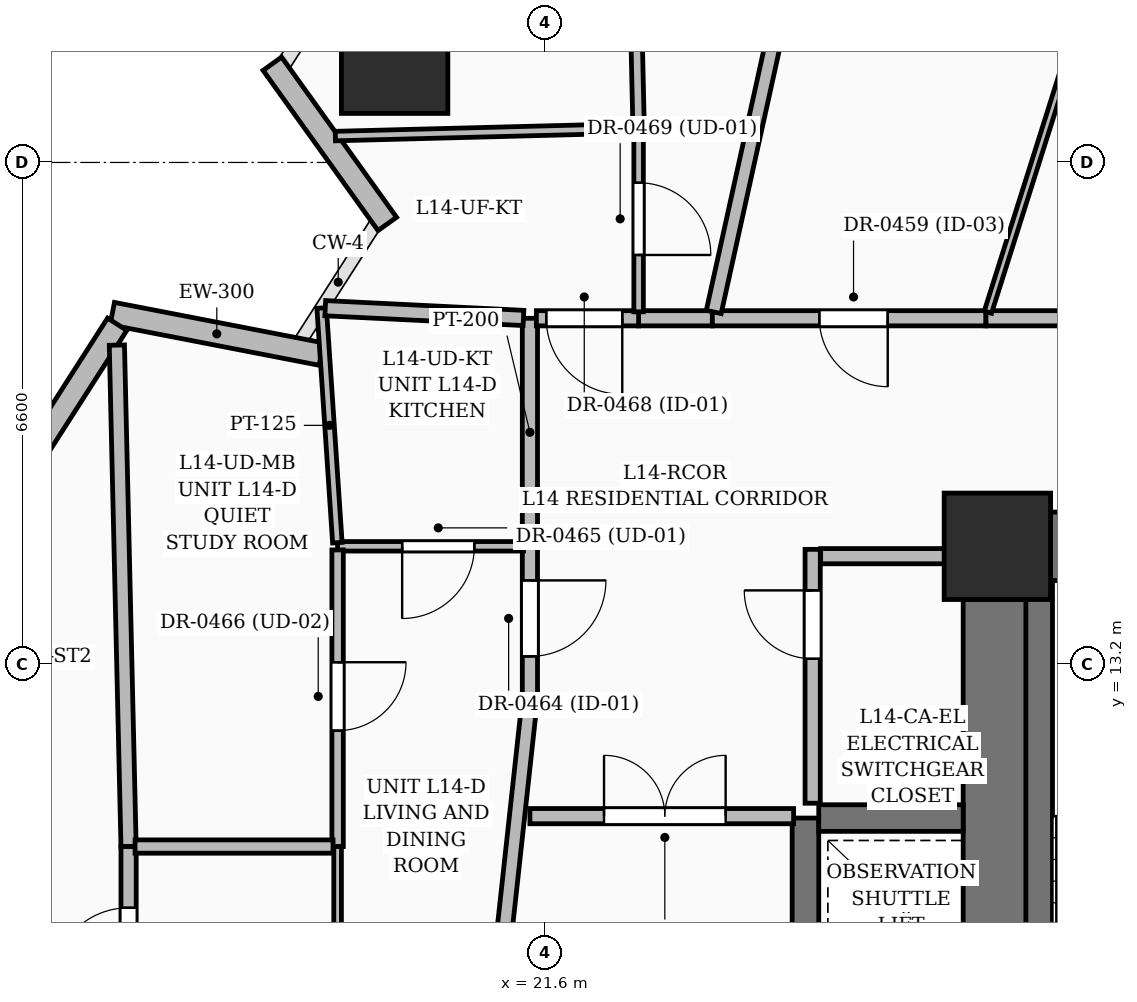
"""IFC4 building model, lengths in metres.
Left out: names, types, materials, properties, quantities, classifications, styles, units other than length and angle.
Written with IfcOpenShell. Run it as: python <this file> out.ifc"""

import sys

from ifc_helpers import new_model, si_unit, direction, frame, frame_2d, origin, origin_2d, place, context, subcontext, project, spatial, rectangle, extrude, element, fill, save


model = new_model("IFC4")
c1 = context("Model", 3, precision=1e-05, world=origin(), true_north=direction((0.0, 1.0)))
c2 = subcontext(c1, "Body", "Model", "MODEL_VIEW")
j1 = project(units=[si_unit("LENGTHUNIT", "METRE"), si_unit("PLANEANGLEUNIT", "RADIAN")], contexts=[c1])
p1 = place(None, origin())
s1 = spatial("IfcSite", under=j1, at=p1, CompositionType="ELEMENT")
p2 = place(p1, origin())
s2 = spatial("IfcBuilding", under=s1, at=p2, CompositionType="ELEMENT")
p3 = place(p2, frame((0.0, 0.0, 60.6)))
s3 = spatial("IfcBuildingStorey", under=s2, at=p3, CompositionType="ELEMENT", Elevation=60.6)
p4 = place(p3, frame((27.55, 14.75, 0.0), z_axis=(0.0, 0.0, 1.0), x_axis=(1.0, 0.0, 0.0)))
e1 = element("IfcColumn", 1, at=p4, inside=s3, PredefinedType="COLUMN", context=c2, shape_type="SweptSolid", body=[
    extrude(rectangle(XDim=1.4, YDim=1.4, at=origin_2d()), origin(), (0.0, 0.0, 1.0), 3.6),
])
p5 = place(p3, frame((28.25, 14.75, 0.0), z_axis=(0.0, 0.0, 1.0), x_axis=(1.0, 0.0, 0.0)))
e2 = element("IfcWall", 2, at=p5, inside=s3, PredefinedType="SHEAR", context=c2, shape_type="SweptSolid", body=[
    extrude(rectangle(XDim=6.2, YDim=0.9, at=frame_2d((3.1, 0.0))), origin(), (0.0, 0.0, 1.0), 3.6),
])
p6 = place(p5, frame((0.925, 0.0, 0.0)))
e3 = element("IfcOpeningElement", 3, at=p6, cuts=e2, PredefinedType="OPENING", context=c2, shape_type="SweptSolid", body=[
    extrude(rectangle(XDim=1.05, YDim=2.15, at=frame_2d((0.525, 1.075))), frame((0.0, 0.46, 0.0), z_axis=(0.0, -1.0, 0.0), x_axis=(1.0, 0.0, 0.0)), (0.0, 0.0, 1.0), 0.92),
])
p7 = place(p3, frame((27.55, 5.25, 0.0), z_axis=(0.0, 0.0, 1.0), x_axis=(0.0, 1.0, 0.0)))
e4 = element("IfcWall", 4, at=p7, inside=s3, PredefinedType="SHEAR", context=c2, shape_type="SweptSolid", body=[
    extrude(rectangle(XDim=8.8, YDim=0.9, at=frame_2d((4.4, 0.0))), origin(), (0.0, 0.0, 1.0), 3.6),
])
p8 = place(p3, frame((28.1, 5.2, 0.0), z_axis=(0.0, 0.0, 1.0), x_axis=(0.0, 1.0, 0.0)))
e5 = element("IfcWall", 5, at=p8, inside=s3, PredefinedType="SOLIDWALL", context=c2, shape_type="SweptSolid", body=[
    extrude(rectangle(XDim=9.1, YDim=0.35, at=frame_2d((4.55, 0.0))), origin(), (0.0, 0.0, 1.0), 3.6),
])
p9 = place(p3, frame((25.025, 6.225, 0.0), z_axis=(0.0, 0.0, 1.0), x_axis=(0.0, 1.0, 0.0)))
e6 = element("IfcWall", 6, at=p9, inside=s3, PredefinedType="SOLIDWALL", context=c2, shape_type="SweptSolid", body=[
    extrude(rectangle(XDim=4.95, YDim=0.35, at=frame_2d((2.475, 0.0))), origin(), (0.0, 0.0, 1.0), 3.6),
])
p10 = place(p3, frame((25.2, 11.175, 0.0), z_axis=(0.0, 0.0, 1.0), x_axis=(1.0, 0.0, 0.0)))
e7 = element("IfcWall", 7, at=p10, inside=s3, PredefinedType="SOLIDWALL", context=c2, shape_type="SweptSolid", body=[
    extrude(rectangle(XDim=1.9, YDim=0.35, at=frame_2d((0.95, 0.0))), origin(), (0.0, 0.0, 1.0), 3.6),
])
p11 = place(p3, frame((19.62, 21.145, 0.0), z_axis=(0.0, 0.0, 1.0), x_axis=(1.0, 0.0, 0.0)))
e8 = element("IfcColumn", 8, at=p11, inside=s3, PredefinedType="COLUMN", context=c2, shape_type="SweptSolid", body=[
    extrude(rectangle(XDim=1.4, YDim=1.4, at=origin_2d()), origin(), (0.0, 0.0, 1.0), 3.6),
])
p12 = place(p3, frame((15.906, 17.812, 0.0), z_axis=(0.0, 0.0, 1.0), x_axis=(0.981749415704, -0.190179086032, 0.0)))
e9 = element("IfcWall", 9, at=p12, inside=s3, PredefinedType="SOLIDWALL", context=c2, shape_type="SweptSolid", body=[
    extrude(rectangle(XDim=2.801, YDim=0.3, at=frame_2d((1.4, 0.0))), origin(), (0.0, 0.0, 1.0), 2.375),
])
p13 = place(p3, frame((19.524, 18.991, 0.0), z_axis=(0.0, 0.0, 1.0), x_axis=(-0.58299973372, 0.812472344442, 0.0)))
e10 = element("IfcWall", 10, at=p13, inside=s3, PredefinedType="SOLIDWALL", context=c2, shape_type="SweptSolid", body=[
    extrude(rectangle(XDim=2.594, YDim=0.3, at=frame_2d((1.297, 0.0))), origin(), (0.0, 0.0, 1.0), 2.375),
])
p14 = place(p3, frame((12.324, 11.981, 0.0), z_axis=(0.0, 0.0, 1.0), x_axis=(0.539544650361, 0.841956988371, 0.0)))
e11 = element("IfcWall", 11, at=p14, inside=s3, PredefinedType="SOLIDWALL", context=c2, shape_type="SweptSolid", body=[
    extrude(rectangle(XDim=6.758, YDim=0.3, at=frame_2d((3.379, 0.0))), origin(), (0.0, 0.0, 1.0), 3.35),
])
p15 = place(p14, frame((2.1, 0.0, 0.55)))
e12 = element("IfcOpeningElement", 12, at=p15, cuts=e11, PredefinedType="OPENING", context=c2, shape_type="SweptSolid", body=[
    extrude(rectangle(XDim=2.1, YDim=2.4, at=frame_2d((1.05, 1.2))), frame((0.0, 0.16, 0.0), z_axis=(0.0, -1.0, 0.0), x_axis=(1.0, 0.0, 0.0)), (0.0, 0.0, 1.0), 0.32),
])
p16 = place(p3, frame((25.12, 11.37, 0.0), z_axis=(0.0, 0.0, 1.0), x_axis=(0.0, 1.0, 0.0)))
e13 = element("IfcWall", 13, at=p16, inside=s3, PredefinedType="PARTITIONING", context=c2, shape_type="SweptSolid", body=[
    extrude(rectangle(XDim=3.34, YDim=0.2, at=frame_2d((1.67, 0.0))), origin(), (0.0, 0.0, 1.0), 3.35),
])
p17 = place(p16, frame((1.9, 0.0, 0.0)))
e14 = element("IfcOpeningElement", 14, at=p17, cuts=e13, PredefinedType="OPENING", context=c2, shape_type="SweptSolid", body=[
    extrude(rectangle(XDim=0.9, YDim=2.1, at=frame_2d((0.45, 1.05))), frame((0.0, 0.11, 0.0), z_axis=(0.0, -1.0, 0.0), x_axis=(1.0, 0.0, 0.0)), (0.0, 0.0, 1.0), 0.22),
])
p18 = place(p3, frame((25.225, 14.62, 0.0), z_axis=(0.0, 0.0, 1.0), x_axis=(1.0, 0.0, 0.0)))
e15 = element("IfcWall", 15, at=p18, inside=s3, PredefinedType="PARTITIONING", context=c2, shape_type="SweptSolid", body=[
    extrude(rectangle(XDim=1.86, YDim=0.2, at=frame_2d((0.93, 0.0))), origin(), (0.0, 0.0, 1.0), 3.35),
])
p19 = place(p3, frame((21.4, 11.2, 0.0), z_axis=(0.0, 0.0, 1.0), x_axis=(1.0, 0.0, 0.0)))
e16 = element("IfcWall", 16, at=p19, inside=s3, PredefinedType="PARTITIONING", context=c2, shape_type="SweptSolid", body=[
    extrude(rectangle(XDim=3.469, YDim=0.2, at=frame_2d((1.735, 0.0))), origin(), (0.0, 0.0, 1.0), 2.712),
])
p20 = place(p19, frame((0.975, 0.0, 0.0)))
e17 = element("IfcOpeningElement", 17, at=p20, cuts=e16, PredefinedType="OPENING", context=c2, shape_type="SweptSolid", body=[
    extrude(rectangle(XDim=1.6, YDim=2.3, at=frame_2d((0.8, 1.15))), frame((0.0, 0.11, 0.0), z_axis=(0.0, -1.0, 0.0), x_axis=(1.0, 0.0, 0.0)), (0.0, 0.0, 1.0), 0.22),
])
p21 = place(p3, frame((21.4, 14.75, 0.0), z_axis=(0.0, 0.0, 1.0), x_axis=(0.0, -1.0, 0.0)))
e18 = element("IfcWall", 18, at=p21, inside=s3, PredefinedType="PARTITIONING", context=c2, shape_type="SweptSolid", body=[
    extrude(rectangle(XDim=2.0, YDim=0.2, at=frame_2d((1.0, 0.0))), origin(), (0.0, 0.0, 1.0), 2.712),
])
p22 = place(p21, frame((0.448, 0.0, 0.0)))
e19 = element("IfcOpeningElement", 19, at=p22, cuts=e18, PredefinedType="OPENING", context=c2, shape_type="SweptSolid", body=[
    extrude(rectangle(XDim=1.0, YDim=2.2, at=frame_2d((0.5, 1.1))), frame((0.0, 0.11, 0.0), z_axis=(0.0, -1.0, 0.0), x_axis=(1.0, 0.0, 0.0)), (0.0, 0.0, 1.0), 0.22),
])
p23 = place(p3, frame((21.4, 17.75, 0.0), z_axis=(0.0, 0.0, 1.0), x_axis=(0.0, -1.0, 0.0)))
e20 = element("IfcWall", 20, at=p23, inside=s3, PredefinedType="PARTITIONING", context=c2, shape_type="SweptSolid", body=[
    extrude(rectangle(XDim=3.0, YDim=0.2, at=frame_2d((1.5, 0.0))), origin(), (0.0, 0.0, 1.0), 3.35),
])
p24 = place(p3, frame((23.8, 17.75, 0.0), z_axis=(0.0, 0.0, 1.0), x_axis=(-1.0, 0.0, 0.0)))
e21 = element("IfcWall", 21, at=p24, inside=s3, PredefinedType="PARTITIONING", context=c2, shape_type="SweptSolid", body=[
    extrude(rectangle(XDim=0.97, YDim=0.2, at=frame_2d((0.485, 0.0))), origin(), (0.0, 0.0, 1.0), 2.279),
])
p25 = place(p3, frame((22.83, 17.75, 0.0), z_axis=(0.0, 0.0, 1.0), x_axis=(-1.0, 0.0, 0.0)))
e22 = element("IfcWall", 22, at=p25, inside=s3, PredefinedType="PARTITIONING", context=c2, shape_type="SweptSolid", body=[
    extrude(rectangle(XDim=1.345, YDim=0.2, at=frame_2d((0.672, 0.0))), origin(), (0.0, 0.0, 1.0), 3.35),
])
p26 = place(p25, frame((0.215, 0.0, 0.0)))
e23 = element("IfcOpeningElement", 23, at=p26, cuts=e22, PredefinedType="OPENING", context=c2, shape_type="SweptSolid", body=[
    extrude(rectangle(XDim=1.0, YDim=2.2, at=frame_2d((0.5, 1.1))), frame((0.0, 0.11, 0.0), z_axis=(0.0, -1.0, 0.0), x_axis=(1.0, 0.0, 0.0)), (0.0, 0.0, 1.0), 0.22),
])
p27 = place(p3, frame((27.4, 17.75, 0.0), z_axis=(0.0, 0.0, 1.0), x_axis=(-1.0, 0.0, 0.0)))
e24 = element("IfcWall", 24, at=p27, inside=s3, PredefinedType="PARTITIONING", context=c2, shape_type="SweptSolid", body=[
    extrude(rectangle(XDim=3.6, YDim=0.2, at=frame_2d((1.8, 0.0))), origin(), (0.0, 0.0, 1.0), 2.279),
])
p28 = place(p27, frame((1.292, 0.0, 0.0)))
e25 = element("IfcOpeningElement", 25, at=p28, cuts=e24, PredefinedType="OPENING", context=c2, shape_type="SweptSolid", body=[
    extrude(rectangle(XDim=0.9, YDim=2.1, at=frame_2d((0.45, 1.05))), frame((0.0, 0.11, 0.0), z_axis=(0.0, -1.0, 0.0), x_axis=(1.0, 0.0, 0.0)), (0.0, 0.0, 1.0), 0.22),
])
p29 = place(p3, frame((33.4, 17.75, 0.0), z_axis=(0.0, 0.0, 1.0), x_axis=(-1.0, 0.0, 0.0)))
e26 = element("IfcWall", 26, at=p29, inside=s3, PredefinedType="PARTITIONING", context=c2, shape_type="SweptSolid", body=[
    extrude(rectangle(XDim=6.0, YDim=0.2, at=frame_2d((3.0, 0.0))), origin(), (0.0, 0.0, 1.0), 3.35),
])
p30 = place(p29, frame((2.141, 0.0, 0.0)))
e27 = element("IfcOpeningElement", 27, at=p30, cuts=e26, PredefinedType="OPENING", context=c2, shape_type="SweptSolid", body=[
    extrude(rectangle(XDim=1.6, YDim=2.3, at=frame_2d((0.8, 1.15))), frame((0.0, 0.11, 0.0), z_axis=(0.0, -1.0, 0.0), x_axis=(1.0, 0.0, 0.0)), (0.0, 0.0, 1.0), 0.22),
])
p31 = place(p3, frame((16.12, 10.8, 0.0), z_axis=(0.0, 0.0, 1.0), x_axis=(-0.023345842867, 0.999727448668, 0.0)))
e28 = element("IfcWall", 28, at=p31, inside=s3, PredefinedType="PARTITIONING", context=c2, shape_type="SweptSolid", body=[
    extrude(rectangle(XDim=6.599, YDim=0.2, at=frame_2d((3.299, 0.0))), origin(), (0.0, 0.0, 1.0), 2.279),
])
p32 = place(p3, frame((16.12, 8.36, 0.0), z_axis=(0.0, 0.0, 1.0), x_axis=(0.0, 1.0, 0.0)))
e29 = element("IfcWall", 29, at=p32, inside=s3, PredefinedType="PARTITIONING", context=c2, shape_type="SweptSolid", body=[
    extrude(rectangle(XDim=2.44, YDim=0.2, at=frame_2d((1.22, 0.0))), origin(), (0.0, 0.0, 1.0), 2.279),
])
p33 = place(p32, frame((0.635, 0.0, 0.0)))
e30 = element("IfcOpeningElement", 30, at=p33, cuts=e29, PredefinedType="OPENING", context=c2, shape_type="SweptSolid", body=[
    extrude(rectangle(XDim=1.0, YDim=2.2, at=frame_2d((0.5, 1.1))), frame((0.0, 0.11, 0.0), z_axis=(0.0, -1.0, 0.0), x_axis=(1.0, 0.0, 0.0)), (0.0, 0.0, 1.0), 0.22),
])
p34 = place(p3, frame((21.4, 12.75, 0.0), z_axis=(0.0, 0.0, 1.0), x_axis=(-0.108543558266, -0.994091693939, 0.0)))
e31 = element("IfcWall", 31, at=p34, inside=s3, PredefinedType="PARTITIONING", context=c2, shape_type="SweptSolid", body=[
    extrude(rectangle(XDim=10.916, YDim=0.2, at=frame_2d((5.458, 0.0))), origin(), (0.0, 0.0, 1.0), 2.279),
])
p35 = place(p3, frame((21.315, 14.75, 0.0), z_axis=(0.0, 0.0, 1.0), x_axis=(-1.0, 0.0, 0.0)))
e32 = element("IfcWall", 32, at=p35, inside=s3, PredefinedType="PARTITIONING", context=c2, shape_type="SweptSolid", body=[
    extrude(rectangle(XDim=2.445, YDim=0.125, at=frame_2d((1.222, 0.0))), origin(), (0.0, 0.0, 1.0), 2.712),
])
p36 = place(p35, frame((0.646, 0.0, 0.0)))
e33 = element("IfcOpeningElement", 33, at=p36, cuts=e32, PredefinedType="OPENING", context=c2, shape_type="SweptSolid", body=[
    extrude(rectangle(XDim=0.95, YDim=2.2, at=frame_2d((0.475, 1.1))), frame((0.0, 0.072, 0.0), z_axis=(0.0, -1.0, 0.0), x_axis=(1.0, 0.0, 0.0)), (0.0, 0.0, 1.0), 0.145),
])
p37 = place(p3, frame((18.87, 14.702, 0.0), z_axis=(0.0, 0.0, 1.0), x_axis=(0.0, -1.0, 0.0)))
e34 = element("IfcWall", 34, at=p37, inside=s3, PredefinedType="PARTITIONING", context=c2, shape_type="SweptSolid", body=[
    extrude(rectangle(XDim=3.902, YDim=0.15, at=frame_2d((1.951, 0.0))), origin(), (0.0, 0.0, 1.0), 2.712),
])
p38 = place(p37, frame((1.478, 0.0, 0.0)))
e35 = element("IfcOpeningElement", 35, at=p38, cuts=e34, PredefinedType="OPENING", context=c2, shape_type="SweptSolid", body=[
    extrude(rectangle(XDim=0.9, YDim=2.15, at=frame_2d((0.45, 1.075))), frame((0.0, 0.085, 0.0), z_axis=(0.0, -1.0, 0.0), x_axis=(1.0, 0.0, 0.0)), (0.0, 0.0, 1.0), 0.17),
])
p39 = place(p3, frame((18.87, 10.8, 0.0), z_axis=(0.0, 0.0, 1.0), x_axis=(0.0, -1.0, 0.0)))
e36 = element("IfcWall", 36, at=p39, inside=s3, PredefinedType="PARTITIONING", context=c2, shape_type="SweptSolid", body=[
    extrude(rectangle(XDim=6.16, YDim=0.1, at=frame_2d((3.08, 0.0))), origin(), (0.0, 0.0, 1.0), 2.279),
])
p40 = place(p39, frame((2.63, 0.0, 0.0)))
e37 = element("IfcOpeningElement", 37, at=p40, cuts=e36, PredefinedType="OPENING", context=c2, shape_type="SweptSolid", body=[
    extrude(rectangle(XDim=0.9, YDim=2.15, at=frame_2d((0.45, 1.075))), frame((0.0, 0.06, 0.0), z_axis=(0.0, -1.0, 0.0), x_axis=(1.0, 0.0, 0.0)), (0.0, 0.0, 1.0), 0.12),
])
p41 = place(p3, frame((18.66, 17.885, 0.0), z_axis=(0.0, 0.0, 1.0), x_axis=(0.066822712134, -0.997764864656, 0.0)))
e38 = element("IfcWall", 38, at=p41, inside=s3, PredefinedType="PARTITIONING", context=c2, shape_type="SweptSolid", body=[
    extrude(rectangle(XDim=3.094, YDim=0.125, at=frame_2d((1.547, 0.0))), origin(), (0.0, 0.0, 1.0), 3.35),
])
p42 = place(p3, frame((21.315, 17.754, 0.0), z_axis=(0.0, 0.0, 1.0), x_axis=(-0.998785002615, 0.049280001533, 0.0)))
e39 = element("IfcWall", 39, at=p42, inside=s3, PredefinedType="PARTITIONING", context=c2, shape_type="SweptSolid", body=[
    extrude(rectangle(XDim=2.611, YDim=0.2, at=frame_2d((1.305, 0.0))), origin(), (0.0, 0.0, 1.0), 2.712),
])
p43 = place(p3, frame((16.205, 10.8, 0.0), z_axis=(0.0, 0.0, 1.0), x_axis=(1.0, 0.0, 0.0)))
e40 = element("IfcWall", 40, at=p43, inside=s3, PredefinedType="PARTITIONING", context=c2, shape_type="SweptSolid", body=[
    extrude(rectangle(XDim=2.605, YDim=0.175, at=frame_2d((1.302, 0.0))), origin(), (0.0, 0.0, 1.0), 2.279),
])
p44 = place(p3, frame((22.83, 20.25, 0.0), z_axis=(0.0, 0.0, 1.0), x_axis=(0.0, -1.0, 0.0)))
e41 = element("IfcWall", 41, at=p44, inside=s3, PredefinedType="PARTITIONING", context=c2, shape_type="SweptSolid", body=[
    extrude(rectangle(XDim=2.415, YDim=0.125, at=frame_2d((1.208, 0.0))), origin(), (0.0, 0.0, 1.0), 2.279),
])
p45 = place(p44, frame((0.717, 0.0, 0.0)))
e42 = element("IfcOpeningElement", 42, at=p45, cuts=e41, PredefinedType="OPENING", context=c2, shape_type="SweptSolid", body=[
    extrude(rectangle(XDim=0.95, YDim=2.2, at=frame_2d((0.475, 1.1))), frame((0.0, 0.072, 0.0), z_axis=(0.0, -1.0, 0.0), x_axis=(1.0, 0.0, 0.0)), (0.0, 0.0, 1.0), 0.145),
])
p46 = place(p3, frame((22.659, 27.893, 0.0), z_axis=(0.0, 0.0, 1.0), x_axis=(0.022386262274, -0.99974939623, 0.0)))
e43 = element("IfcWall", 43, at=p46, inside=s3, PredefinedType="PARTITIONING", context=c2, shape_type="SweptSolid", body=[
    extrude(rectangle(XDim=7.645, YDim=0.15, at=frame_2d((3.823, 0.0))), origin(), (0.0, 0.0, 1.0), 2.37),
])
p47 = place(p46, frame((3.314, 0.0, 0.0)))
e44 = element("IfcOpeningElement", 44, at=p47, cuts=e43, PredefinedType="OPENING", context=c2, shape_type="SweptSolid", body=[
    extrude(rectangle(XDim=0.9, YDim=2.15, at=frame_2d((0.45, 1.075))), frame((0.0, 0.085, 0.0), z_axis=(0.0, -1.0, 0.0), x_axis=(1.0, 0.0, 0.0)), (0.0, 0.0, 1.0), 0.17),
])
p48 = place(p3, frame((23.818, 17.833, 0.0), z_axis=(0.0, 0.0, 1.0), x_axis=(0.215621860536, 0.976476939441, 0.0)))
e45 = element("IfcWall", 45, at=p48, inside=s3, PredefinedType="PARTITIONING", context=c2, shape_type="SweptSolid", body=[
    extrude(rectangle(XDim=12.052, YDim=0.2, at=frame_2d((6.026, 0.0))), origin(), (0.0, 0.0, 1.0), 2.279),
])
p49 = place(p3, frame((22.782, 20.249, 0.0), z_axis=(0.0, 0.0, 1.0), x_axis=(-0.999665137203, -0.025876890473, 0.0)))
e46 = element("IfcWall", 46, at=p49, inside=s3, PredefinedType="PARTITIONING", context=c2, shape_type="SweptSolid", body=[
    extrude(rectangle(XDim=3.944, YDim=0.125, at=frame_2d((1.972, 0.0))), origin(), (0.0, 0.0, 1.0), 2.279),
])
p50 = place(p3, frame((27.426, 17.831, 0.0), z_axis=(0.0, 0.0, 1.0), x_axis=(0.301606844208, 0.95343238435, 0.0)))
e47 = element("IfcWall", 47, at=p50, inside=s3, PredefinedType="PARTITIONING", context=c2, shape_type="SweptSolid", body=[
    extrude(rectangle(XDim=15.333, YDim=0.1, at=frame_2d((7.667, 0.0))), origin(), (0.0, 0.0, 1.0), 2.279),
])
p51 = place(p17, origin())
e48 = element("IfcDoor", 48, at=p51, inside=s3, OperationType="SINGLE_SWING_RIGHT", PredefinedType="DOOR", context=c2, shape_type="SweptSolid", body=[
    extrude(rectangle(XDim=0.9, YDim=2.1, at=frame_2d((0.45, 1.05))), frame((0.0, 0.025, 0.0), z_axis=(0.0, -1.0, 0.0), x_axis=(1.0, 0.0, 0.0)), (0.0, 0.0, 1.0), 0.05),
])
fill(e14, e48)
p52 = place(p20, origin())
e49 = element("IfcDoor", 49, at=p52, inside=s3, OperationType="DOUBLE_DOOR_SINGLE_SWING", PredefinedType="DOOR", context=c2, shape_type="SweptSolid", body=[
    extrude(rectangle(XDim=1.6, YDim=2.3, at=frame_2d((0.8, 1.15))), frame((0.0, 0.025, 0.0), z_axis=(0.0, -1.0, 0.0), x_axis=(1.0, 0.0, 0.0)), (0.0, 0.0, 1.0), 0.05),
])
fill(e17, e49)
p53 = place(p28, origin())
e50 = element("IfcDoor", 50, at=p53, inside=s3, OperationType="SINGLE_SWING_LEFT", PredefinedType="DOOR", context=c2, shape_type="SweptSolid", body=[
    extrude(rectangle(XDim=0.9, YDim=2.1, at=frame_2d((0.45, 1.05))), frame((0.0, 0.025, 0.0), z_axis=(0.0, -1.0, 0.0), x_axis=(1.0, 0.0, 0.0)), (0.0, 0.0, 1.0), 0.05),
])
fill(e25, e50)
p54 = place(p22, origin())
e51 = element("IfcDoor", 51, at=p54, inside=s3, OperationType="SINGLE_SWING_LEFT", PredefinedType="DOOR", context=c2, shape_type="SweptSolid", body=[
    extrude(rectangle(XDim=1.0, YDim=2.2, at=frame_2d((0.5, 1.1))), frame((0.0, 0.025, 0.0), z_axis=(0.0, -1.0, 0.0), x_axis=(1.0, 0.0, 0.0)), (0.0, 0.0, 1.0), 0.05),
])
fill(e19, e51)
p55 = place(p36, origin())
e52 = element("IfcDoor", 52, at=p55, inside=s3, OperationType="SINGLE_SWING_RIGHT", PredefinedType="DOOR", context=c2, shape_type="SweptSolid", body=[
    extrude(rectangle(XDim=0.95, YDim=2.2, at=frame_2d((0.475, 1.1))), frame((0.0, 0.025, 0.0), z_axis=(0.0, -1.0, 0.0), x_axis=(1.0, 0.0, 0.0)), (0.0, 0.0, 1.0), 0.05),
])
fill(e33, e52)
p56 = place(p38, origin())
e53 = element("IfcDoor", 53, at=p56, inside=s3, OperationType="SINGLE_SWING_LEFT", PredefinedType="DOOR", context=c2, shape_type="SweptSolid", body=[
    extrude(rectangle(XDim=0.9, YDim=2.15, at=frame_2d((0.45, 1.075))), frame((0.0, 0.025, 0.0), z_axis=(0.0, -1.0, 0.0), x_axis=(1.0, 0.0, 0.0)), (0.0, 0.0, 1.0), 0.05),
])
fill(e35, e53)
p57 = place(p26, origin())
e54 = element("IfcDoor", 54, at=p57, inside=s3, OperationType="SINGLE_SWING_LEFT", PredefinedType="DOOR", context=c2, shape_type="SweptSolid", body=[
    extrude(rectangle(XDim=1.0, YDim=2.2, at=frame_2d((0.5, 1.1))), frame((0.0, 0.025, 0.0), z_axis=(0.0, -1.0, 0.0), x_axis=(1.0, 0.0, 0.0)), (0.0, 0.0, 1.0), 0.05),
])
fill(e23, e54)
p58 = place(p45, origin())
e55 = element("IfcDoor", 55, at=p58, inside=s3, OperationType="SINGLE_SWING_RIGHT", PredefinedType="DOOR", context=c2, shape_type="SweptSolid", body=[
    extrude(rectangle(XDim=0.95, YDim=2.2, at=frame_2d((0.475, 1.1))), frame((0.0, 0.025, 0.0), z_axis=(0.0, -1.0, 0.0), x_axis=(1.0, 0.0, 0.0)), (0.0, 0.0, 1.0), 0.05),
])
fill(e42, e55)
p59 = place(p33, origin())
e56 = element("IfcDoor", 56, at=p59, inside=s3, OperationType="SINGLE_SWING_LEFT", PredefinedType="DOOR", context=c2, shape_type="SweptSolid", body=[
    extrude(rectangle(XDim=1.0, YDim=2.2, at=frame_2d((0.5, 1.1))), frame((0.0, 0.025, 0.0), z_axis=(0.0, -1.0, 0.0), x_axis=(1.0, 0.0, 0.0)), (0.0, 0.0, 1.0), 0.05),
])
fill(e30, e56)
save(model, sys.argv[1])
